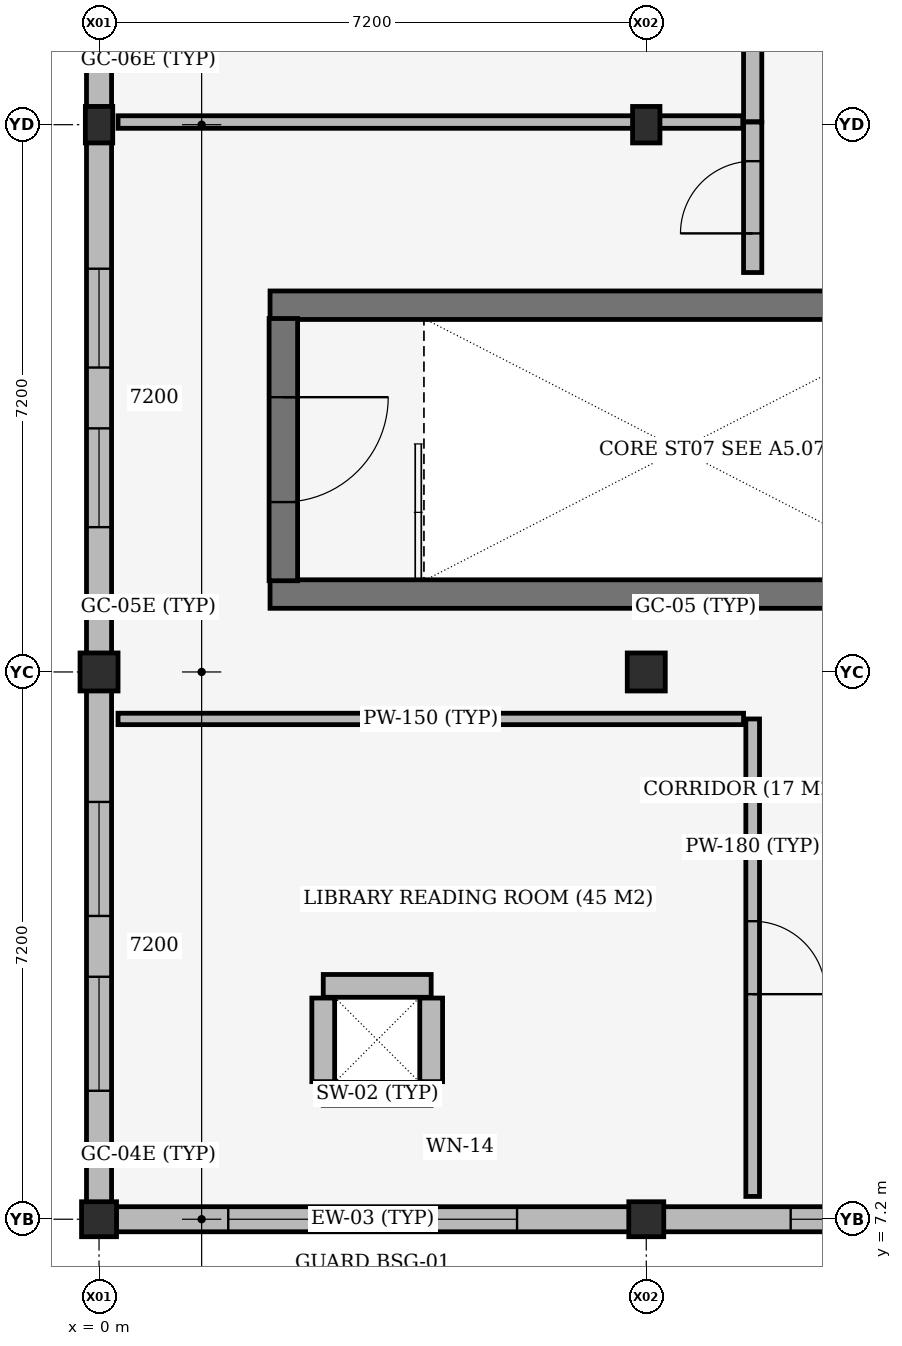
"""IFC4 building model, lengths in metres.
Left out: names, types, materials, properties, quantities, classifications, styles, units other than length and angle.
Written with IfcOpenShell. Run it as: python <this file> out.ifc"""

import sys

from ifc_helpers import new_model, si_unit, direction, frame, frame_2d, origin, origin_2d, place, context, subcontext, project, spatial, rectangle, extrude, element, fill, save


model = new_model("IFC4")
c1 = context("Model", 3, precision=1e-05, world=origin(), true_north=direction((0.0, 1.0)))
c2 = subcontext(c1, "Body", "Model", "MODEL_VIEW")
j1 = project(units=[si_unit("LENGTHUNIT", "METRE"), si_unit("PLANEANGLEUNIT", "RADIAN")], contexts=[c1])
p1 = place(None, origin())
s1 = spatial("IfcSite", under=j1, at=p1, CompositionType="ELEMENT")
p2 = place(p1, origin())
s2 = spatial("IfcBuilding", under=s1, at=p2, CompositionType="ELEMENT")
p3 = place(p2, frame((0.0, 0.0, 22.2)))
s3 = spatial("IfcBuildingStorey", under=s2, at=p3, CompositionType="ELEMENT", Elevation=22.2)
p4 = place(p3, frame((2.95, 8.85, 0.0), z_axis=(0.0, 0.0, 1.0), x_axis=(1.0, 0.0, 0.0)))
e1 = element("IfcWall", 1, at=p4, inside=s3, PredefinedType="SHEAR", context=c2, shape_type="SweptSolid", body=[
    extrude(rectangle(XDim=1.42, YDim=0.3, at=frame_2d((0.71, 0.0))), origin(), (0.0, 0.0, 1.0), 3.96),
])
p5 = place(p3, frame((4.37, 9.01, 0.0), z_axis=(0.0, 0.0, 1.0), x_axis=(0.0, 1.0, 0.0)))
e2 = element("IfcWall", 2, at=p5, inside=s3, PredefinedType="SHEAR", context=c2, shape_type="SweptSolid", body=[
    extrude(rectangle(XDim=1.1, YDim=0.3, at=frame_2d((0.55, 0.0))), origin(), (0.0, 0.0, 1.0), 3.96),
])
p6 = place(p3, frame((4.37, 10.27, 0.0), z_axis=(0.0, 0.0, 1.0), x_axis=(-1.0, 0.0, 0.0)))
e3 = element("IfcWall", 3, at=p6, inside=s3, PredefinedType="SHEAR", context=c2, shape_type="SweptSolid", body=[
    extrude(rectangle(XDim=1.42, YDim=0.3, at=frame_2d((0.71, 0.0))), origin(), (0.0, 0.0, 1.0), 3.96),
])
p7 = place(p3, frame((2.95, 10.11, 0.0), z_axis=(0.0, 0.0, 1.0), x_axis=(0.0, -1.0, 0.0)))
e4 = element("IfcWall", 4, at=p7, inside=s3, PredefinedType="SHEAR", context=c2, shape_type="SweptSolid", body=[
    extrude(rectangle(XDim=1.1, YDim=0.3, at=frame_2d((0.55, 0.0))), origin(), (0.0, 0.0, 1.0), 3.96),
])
p8 = place(p3, frame((0.0, 7.2, 0.0), z_axis=(0.0, 0.0, 1.0), x_axis=(1.0, 0.0, 0.0)))
e5 = element("IfcColumn", 5, at=p8, inside=s3, PredefinedType="COLUMN", context=c2, shape_type="SweptSolid", body=[
    extrude(rectangle(XDim=0.46, YDim=0.46, at=origin_2d()), origin(), (0.0, 0.0, 1.0), 3.96),
])
p9 = place(p3, frame((0.0, 14.4, 0.0), z_axis=(0.0, 0.0, 1.0), x_axis=(1.0, 0.0, 0.0)))
e6 = element("IfcColumn", 6, at=p9, inside=s3, PredefinedType="COLUMN", context=c2, shape_type="SweptSolid", body=[
    extrude(rectangle(XDim=0.5, YDim=0.5, at=origin_2d()), origin(), (0.0, 0.0, 1.0), 3.96),
])
p10 = place(p3, frame((0.0, 21.6, 0.0), z_axis=(0.0, 0.0, 1.0), x_axis=(1.0, 0.0, 0.0)))
e7 = element("IfcColumn", 7, at=p10, inside=s3, PredefinedType="COLUMN", context=c2, shape_type="SweptSolid", body=[
    extrude(rectangle(XDim=0.36, YDim=0.48, at=origin_2d()), origin(), (0.0, 0.0, 1.0), 3.96),
])
p11 = place(p3, frame((7.2, 7.2, 0.0), z_axis=(0.0, 0.0, 1.0), x_axis=(1.0, 0.0, 0.0)))
e8 = element("IfcColumn", 8, at=p11, inside=s3, PredefinedType="COLUMN", context=c2, shape_type="SweptSolid", body=[
    extrude(rectangle(XDim=0.46, YDim=0.46, at=origin_2d()), origin(), (0.0, 0.0, 1.0), 3.96),
])
p12 = place(p3, frame((7.2, 14.4, 0.0), z_axis=(0.0, 0.0, 1.0), x_axis=(1.0, 0.0, 0.0)))
e9 = element("IfcColumn", 9, at=p12, inside=s3, PredefinedType="COLUMN", context=c2, shape_type="SweptSolid", body=[
    extrude(rectangle(XDim=0.5, YDim=0.5, at=origin_2d()), origin(), (0.0, 0.0, 1.0), 3.96),
])
p13 = place(p3, frame((7.2, 21.6, 0.0), z_axis=(0.0, 0.0, 1.0), x_axis=(1.0, 0.0, 0.0)))
e10 = element("IfcColumn", 10, at=p13, inside=s3, PredefinedType="COLUMN", context=c2, shape_type="SweptSolid", body=[
    extrude(rectangle(XDim=0.36, YDim=0.48, at=origin_2d()), origin(), (0.0, 0.0, 1.0), 3.96),
])
for number, where, z_axis, x_axis in (
    (11, (2.25, 15.425, 0.0), (0.0, 0.0, 1.0), (1.0, 0.0, 0.0)),
    (12, (11.35, 19.225, 0.0), (0.0, 0.0, 1.0), (-1.0, 0.0, 0.0)),
):
    element("IfcWall", number, at=place(p3, frame(where, z_axis=z_axis, x_axis=x_axis)), inside=s3, PredefinedType="SHEAR", context=c2, shape_type="SweptSolid", body=[
        extrude(rectangle(XDim=9.1, YDim=0.375, at=frame_2d((4.55, 0.0))), origin(), (0.0, 0.0, 1.0), 3.96),
    ])
p14 = place(p3, frame((6.978, 7.2, 0.0), z_axis=(0.0, 0.0, 1.0), x_axis=(-1.0, 0.0, 0.0)))
e13 = element("IfcWall", 13, at=p14, inside=s3, PredefinedType="STANDARD", context=c2, shape_type="SweptSolid", body=[
    extrude(rectangle(XDim=6.756, YDim=0.33, at=frame_2d((3.378, 0.0))), origin(), (0.0, 0.0, 1.0), 3.41),
])
p15 = place(p14, frame((1.478, 0.0, 0.95)))
e14 = element("IfcOpeningElement", 14, at=p15, cuts=e13, PredefinedType="OPENING", context=c2, shape_type="SweptSolid", body=[
    extrude(rectangle(XDim=1.5, YDim=1.8, at=frame_2d((0.75, 0.9))), frame((0.0, 0.175, 0.0), z_axis=(0.0, -1.0, 0.0), x_axis=(1.0, 0.0, 0.0)), (0.0, 0.0, 1.0), 0.35),
])
p16 = place(p14, frame((3.778, 0.0, 0.95)))
e15 = element("IfcOpeningElement", 15, at=p16, cuts=e13, PredefinedType="OPENING", context=c2, shape_type="SweptSolid", body=[
    extrude(rectangle(XDim=1.5, YDim=1.8, at=frame_2d((0.75, 0.9))), frame((0.0, 0.175, 0.0), z_axis=(0.0, -1.0, 0.0), x_axis=(1.0, 0.0, 0.0)), (0.0, 0.0, 1.0), 0.35),
])
p17 = place(p3, frame((14.178, 7.2, 0.0), z_axis=(0.0, 0.0, 1.0), x_axis=(-1.0, 0.0, 0.0)))
e16 = element("IfcWall", 16, at=p17, inside=s3, PredefinedType="STANDARD", context=c2, shape_type="SweptSolid", body=[
    extrude(rectangle(XDim=6.756, YDim=0.33, at=frame_2d((3.378, 0.0))), origin(), (0.0, 0.0, 1.0), 3.34),
])
p18 = place(p17, frame((1.678, 0.0, 0.95)))
e17 = element("IfcOpeningElement", 17, at=p18, cuts=e16, PredefinedType="OPENING", context=c2, shape_type="SweptSolid", body=[
    extrude(rectangle(XDim=1.3, YDim=1.8, at=frame_2d((0.65, 0.9))), frame((0.0, 0.175, 0.0), z_axis=(0.0, -1.0, 0.0), x_axis=(1.0, 0.0, 0.0)), (0.0, 0.0, 1.0), 0.35),
])
p19 = place(p17, frame((3.778, 0.0, 0.95)))
e18 = element("IfcOpeningElement", 18, at=p19, cuts=e16, PredefinedType="OPENING", context=c2, shape_type="SweptSolid", body=[
    extrude(rectangle(XDim=1.3, YDim=1.8, at=frame_2d((0.65, 0.9))), frame((0.0, 0.175, 0.0), z_axis=(0.0, -1.0, 0.0), x_axis=(1.0, 0.0, 0.0)), (0.0, 0.0, 1.0), 0.35),
])
p20 = place(p3, frame((0.0, 7.422, 0.0), z_axis=(0.0, 0.0, 1.0), x_axis=(0.0, 1.0, 0.0)))
e19 = element("IfcWall", 19, at=p20, inside=s3, PredefinedType="STANDARD", context=c2, shape_type="SweptSolid", body=[
    extrude(rectangle(XDim=6.736, YDim=0.33, at=frame_2d((3.368, 0.0))), origin(), (0.0, 0.0, 1.0), 3.96),
])
p21 = place(p20, frame((1.468, 0.0, 0.95)))
e20 = element("IfcOpeningElement", 20, at=p21, cuts=e19, PredefinedType="OPENING", context=c2, shape_type="SweptSolid", body=[
    extrude(rectangle(XDim=1.5, YDim=1.8, at=frame_2d((0.75, 0.9))), frame((0.0, 0.175, 0.0), z_axis=(0.0, -1.0, 0.0), x_axis=(1.0, 0.0, 0.0)), (0.0, 0.0, 1.0), 0.35),
])
p22 = place(p20, frame((3.768, 0.0, 0.95)))
e21 = element("IfcOpeningElement", 21, at=p22, cuts=e19, PredefinedType="OPENING", context=c2, shape_type="SweptSolid", body=[
    extrude(rectangle(XDim=1.5, YDim=1.8, at=frame_2d((0.75, 0.9))), frame((0.0, 0.175, 0.0), z_axis=(0.0, -1.0, 0.0), x_axis=(1.0, 0.0, 0.0)), (0.0, 0.0, 1.0), 0.35),
])
p23 = place(p3, frame((0.0, 14.642, 0.0), z_axis=(0.0, 0.0, 1.0), x_axis=(0.0, 1.0, 0.0)))
e22 = element("IfcWall", 22, at=p23, inside=s3, PredefinedType="STANDARD", context=c2, shape_type="SweptSolid", body=[
    extrude(rectangle(XDim=6.726, YDim=0.33, at=frame_2d((3.363, 0.0))), origin(), (0.0, 0.0, 1.0), 3.96),
])
p24 = place(p23, frame((1.663, 0.0, 0.95)))
e23 = element("IfcOpeningElement", 23, at=p24, cuts=e22, PredefinedType="OPENING", context=c2, shape_type="SweptSolid", body=[
    extrude(rectangle(XDim=1.3, YDim=1.8, at=frame_2d((0.65, 0.9))), frame((0.0, 0.175, 0.0), z_axis=(0.0, -1.0, 0.0), x_axis=(1.0, 0.0, 0.0)), (0.0, 0.0, 1.0), 0.35),
])
p25 = place(p23, frame((3.763, 0.0, 0.95)))
e24 = element("IfcOpeningElement", 24, at=p25, cuts=e22, PredefinedType="OPENING", context=c2, shape_type="SweptSolid", body=[
    extrude(rectangle(XDim=1.3, YDim=1.8, at=frame_2d((0.65, 0.9))), frame((0.0, 0.175, 0.0), z_axis=(0.0, -1.0, 0.0), x_axis=(1.0, 0.0, 0.0)), (0.0, 0.0, 1.0), 0.35),
])
p26 = place(p3, frame((0.0, 21.832, 0.0), z_axis=(0.0, 0.0, 1.0), x_axis=(0.0, 1.0, 0.0)))
e25 = element("IfcWall", 25, at=p26, inside=s3, PredefinedType="STANDARD", context=c2, shape_type="SweptSolid", body=[
    extrude(rectangle(XDim=6.706, YDim=0.33, at=frame_2d((3.353, 0.0))), origin(), (0.0, 0.0, 1.0), 3.96),
])
p27 = place(p26, frame((1.453, 0.0, 0.95)))
e26 = element("IfcOpeningElement", 26, at=p27, cuts=e25, PredefinedType="OPENING", context=c2, shape_type="SweptSolid", body=[
    extrude(rectangle(XDim=1.5, YDim=1.8, at=frame_2d((0.75, 0.9))), frame((0.0, 0.175, 0.0), z_axis=(0.0, -1.0, 0.0), x_axis=(1.0, 0.0, 0.0)), (0.0, 0.0, 1.0), 0.35),
])
p28 = place(p26, frame((3.753, 0.0, 0.95)))
e27 = element("IfcOpeningElement", 27, at=p28, cuts=e25, PredefinedType="OPENING", context=c2, shape_type="SweptSolid", body=[
    extrude(rectangle(XDim=1.5, YDim=1.8, at=frame_2d((0.75, 0.9))), frame((0.0, 0.175, 0.0), z_axis=(0.0, -1.0, 0.0), x_axis=(1.0, 0.0, 0.0)), (0.0, 0.0, 1.0), 0.35),
])
p29 = place(p3, frame((0.13, 7.33, 4.2), z_axis=(0.0, 0.0, 1.0), x_axis=(1.0, 0.0, 0.0)))
e28 = element("IfcWall", 28, at=p29, inside=s3, PredefinedType="PARAPET", context=c2, shape_type="SweptSolid", body=[
    extrude(rectangle(XDim=35.74, YDim=0.245, at=frame_2d((17.87, 0.0))), origin(), (0.0, 0.0, 1.0), 0.95),
])
p30 = place(p3, frame((2.425, 19.05, 0.0), z_axis=(0.0, 0.0, 1.0), x_axis=(0.0, -1.0, 0.0)))
e29 = element("IfcWall", 29, at=p30, inside=s3, PredefinedType="SHEAR", context=c2, shape_type="SweptSolid", body=[
    extrude(rectangle(XDim=3.45, YDim=0.375, at=frame_2d((1.725, 0.0))), origin(), (0.0, 0.0, 1.0), 3.96),
])
p31 = place(p30, frame((1.035, 0.0, 0.0)))
e30 = element("IfcOpeningElement", 30, at=p31, cuts=e29, PredefinedType="OPENING", context=c2, shape_type="SweptSolid", body=[
    extrude(rectangle(XDim=1.38, YDim=2.2, at=frame_2d((0.69, 1.1))), frame((0.0, 0.198, 0.0), z_axis=(0.0, -1.0, 0.0), x_axis=(1.0, 0.0, 0.0)), (0.0, 0.0, 1.0), 0.395),
])
p32 = place(p3, frame((8.6, 7.5, 0.0), z_axis=(0.0, 0.0, 1.0), x_axis=(0.0, 1.0, 0.0)))
e31 = element("IfcWall", 31, at=p32, inside=s3, PredefinedType="PARTITIONING", context=c2, shape_type="SweptSolid", body=[
    extrude(rectangle(XDim=6.282, YDim=0.18, at=frame_2d((3.141, 0.0))), origin(), (0.0, 0.0, 1.0), 3.96),
])
p33 = place(p32, frame((2.661, 0.0, 0.0)))
e32 = element("IfcOpeningElement", 32, at=p33, cuts=e31, PredefinedType="OPENING", context=c2, shape_type="SweptSolid", body=[
    extrude(rectangle(XDim=0.96, YDim=2.15, at=frame_2d((0.48, 1.075))), frame((0.0, 0.1, 0.0), z_axis=(0.0, -1.0, 0.0), x_axis=(1.0, 0.0, 0.0)), (0.0, 0.0, 1.0), 0.2),
])
p34 = place(p3, frame((0.25, 13.782, 0.0), z_axis=(0.0, 0.0, 1.0), x_axis=(1.0, 0.0, 0.0)))
e33 = element("IfcWall", 33, at=p34, inside=s3, PredefinedType="PARTITIONING", context=c2, shape_type="SweptSolid", body=[
    extrude(rectangle(XDim=8.23, YDim=0.15, at=frame_2d((4.115, 0.0))), origin(), (0.0, 0.0, 1.0), 3.96),
])
p35 = place(p3, frame((8.6, 19.655, 0.0), z_axis=(0.0, 0.0, 1.0), x_axis=(0.0, 1.0, 0.0)))
e34 = element("IfcWall", 34, at=p35, inside=s3, PredefinedType="STANDARD", context=c2, shape_type="SweptSolid", body=[
    extrude(rectangle(XDim=1.98, YDim=0.24, at=frame_2d((0.99, 0.0))), origin(), (0.0, 0.0, 1.0), 3.96),
])
p36 = place(p35, frame((0.515, 0.0, 0.0)))
e35 = element("IfcOpeningElement", 35, at=p36, cuts=e34, PredefinedType="OPENING", context=c2, shape_type="SweptSolid", body=[
    extrude(rectangle(XDim=0.95, YDim=2.15, at=frame_2d((0.475, 1.075))), frame((0.0, 0.13, 0.0), z_axis=(0.0, -1.0, 0.0), x_axis=(1.0, 0.0, 0.0)), (0.0, 0.0, 1.0), 0.26),
])
p37 = place(p3, frame((0.25, 21.635, 0.0), z_axis=(0.0, 0.0, 1.0), x_axis=(1.0, 0.0, 0.0)))
e36 = element("IfcWall", 36, at=p37, inside=s3, PredefinedType="PARTITIONING", context=c2, shape_type="SweptSolid", body=[
    extrude(rectangle(XDim=8.22, YDim=0.165, at=frame_2d((4.11, 0.0))), origin(), (0.0, 0.0, 1.0), 3.96),
])
p38 = place(p3, frame((8.6, 21.64, 0.0), z_axis=(0.0, 0.0, 1.0), x_axis=(0.0, 1.0, 0.0)))
e37 = element("IfcWall", 37, at=p38, inside=s3, PredefinedType="STANDARD", context=c2, shape_type="SweptSolid", body=[
    extrude(rectangle(XDim=9.419, YDim=0.24, at=frame_2d((4.709, 0.0))), origin(), (0.0, 0.0, 1.0), 3.96),
])
p39 = place(p38, frame((3.885, 0.0, 0.0)))
e38 = element("IfcOpeningElement", 38, at=p39, cuts=e37, PredefinedType="OPENING", context=c2, shape_type="SweptSolid", body=[
    extrude(rectangle(XDim=1.65, YDim=2.25, at=frame_2d((0.825, 1.125))), frame((0.0, 0.13, 0.0), z_axis=(0.0, -1.0, 0.0), x_axis=(1.0, 0.0, 0.0)), (0.0, 0.0, 1.0), 0.26),
])
p40 = place(p15, origin())
e39 = element("IfcWindow", 39, at=p40, inside=s3, PartitioningType="DOUBLE_PANEL_VERTICAL", PredefinedType="WINDOW", context=c2, shape_type="SweptSolid", body=[
    extrude(rectangle(XDim=1.5, YDim=1.8, at=frame_2d((0.75, 0.9))), frame((0.0, 0.03, 0.0), z_axis=(0.0, -1.0, 0.0), x_axis=(1.0, 0.0, 0.0)), (0.0, 0.0, 1.0), 0.06),
])
fill(e14, e39)
p41 = place(p16, origin())
e40 = element("IfcWindow", 40, at=p41, inside=s3, PartitioningType="DOUBLE_PANEL_VERTICAL", PredefinedType="WINDOW", context=c2, shape_type="SweptSolid", body=[
    extrude(rectangle(XDim=1.5, YDim=1.8, at=frame_2d((0.75, 0.9))), frame((0.0, 0.03, 0.0), z_axis=(0.0, -1.0, 0.0), x_axis=(1.0, 0.0, 0.0)), (0.0, 0.0, 1.0), 0.06),
])
fill(e15, e40)
p42 = place(p19, origin())
e41 = element("IfcWindow", 41, at=p42, inside=s3, PartitioningType="DOUBLE_PANEL_VERTICAL", PredefinedType="WINDOW", context=c2, shape_type="SweptSolid", body=[
    extrude(rectangle(XDim=1.3, YDim=1.8, at=frame_2d((0.65, 0.9))), frame((0.0, 0.03, 0.0), z_axis=(0.0, -1.0, 0.0), x_axis=(1.0, 0.0, 0.0)), (0.0, 0.0, 1.0), 0.06),
])
fill(e18, e41)
p43 = place(p21, origin())
e42 = element("IfcWindow", 42, at=p43, inside=s3, PartitioningType="DOUBLE_PANEL_VERTICAL", PredefinedType="WINDOW", context=c2, shape_type="SweptSolid", body=[
    extrude(rectangle(XDim=1.5, YDim=1.8, at=frame_2d((0.75, 0.9))), frame((0.0, 0.03, 0.0), z_axis=(0.0, -1.0, 0.0), x_axis=(1.0, 0.0, 0.0)), (0.0, 0.0, 1.0), 0.06),
])
fill(e20, e42)
p44 = place(p22, origin())
e43 = element("IfcWindow", 43, at=p44, inside=s3, PartitioningType="DOUBLE_PANEL_VERTICAL", PredefinedType="WINDOW", context=c2, shape_type="SweptSolid", body=[
    extrude(rectangle(XDim=1.5, YDim=1.8, at=frame_2d((0.75, 0.9))), frame((0.0, 0.03, 0.0), z_axis=(0.0, -1.0, 0.0), x_axis=(1.0, 0.0, 0.0)), (0.0, 0.0, 1.0), 0.06),
])
fill(e21, e43)
p45 = place(p24, origin())
e44 = element("IfcWindow", 44, at=p45, inside=s3, PartitioningType="DOUBLE_PANEL_VERTICAL", PredefinedType="WINDOW", context=c2, shape_type="SweptSolid", body=[
    extrude(rectangle(XDim=1.3, YDim=1.8, at=frame_2d((0.65, 0.9))), frame((0.0, 0.03, 0.0), z_axis=(0.0, -1.0, 0.0), x_axis=(1.0, 0.0, 0.0)), (0.0, 0.0, 1.0), 0.06),
])
fill(e23, e44)
p46 = place(p25, origin())
e45 = element("IfcWindow", 45, at=p46, inside=s3, PartitioningType="DOUBLE_PANEL_VERTICAL", PredefinedType="WINDOW", context=c2, shape_type="SweptSolid", body=[
    extrude(rectangle(XDim=1.3, YDim=1.8, at=frame_2d((0.65, 0.9))), frame((0.0, 0.03, 0.0), z_axis=(0.0, -1.0, 0.0), x_axis=(1.0, 0.0, 0.0)), (0.0, 0.0, 1.0), 0.06),
])
fill(e24, e45)
p47 = place(p31, origin())
e46 = element("IfcDoor", 46, at=p47, inside=s3, OperationType="DOUBLE_DOOR_SINGLE_SWING", PredefinedType="DOOR", context=c2, shape_type="SweptSolid", body=[
    extrude(rectangle(XDim=1.38, YDim=2.2, at=frame_2d((0.69, 1.1))), frame((0.0, 0.025, 0.0), z_axis=(0.0, -1.0, 0.0), x_axis=(1.0, 0.0, 0.0)), (0.0, 0.0, 1.0), 0.05),
])
fill(e30, e46)
p48 = place(p33, origin())
e47 = element("IfcDoor", 47, at=p48, inside=s3, OperationType="SINGLE_SWING_RIGHT", PredefinedType="DOOR", context=c2, shape_type="SweptSolid", body=[
    extrude(rectangle(XDim=0.96, YDim=2.15, at=frame_2d((0.48, 1.075))), frame((0.0, 0.025, 0.0), z_axis=(0.0, -1.0, 0.0), x_axis=(1.0, 0.0, 0.0)), (0.0, 0.0, 1.0), 0.05),
])
fill(e32, e47)
p49 = place(p36, origin())
e48 = element("IfcDoor", 48, at=p49, inside=s3, OperationType="SINGLE_SWING_LEFT", PredefinedType="DOOR", context=c2, shape_type="SweptSolid", body=[
    extrude(rectangle(XDim=0.95, YDim=2.15, at=frame_2d((0.475, 1.075))), frame((0.0, 0.025, 0.0), z_axis=(0.0, -1.0, 0.0), x_axis=(1.0, 0.0, 0.0)), (0.0, 0.0, 1.0), 0.05),
])
fill(e35, e48)
save(model, sys.argv[1])
